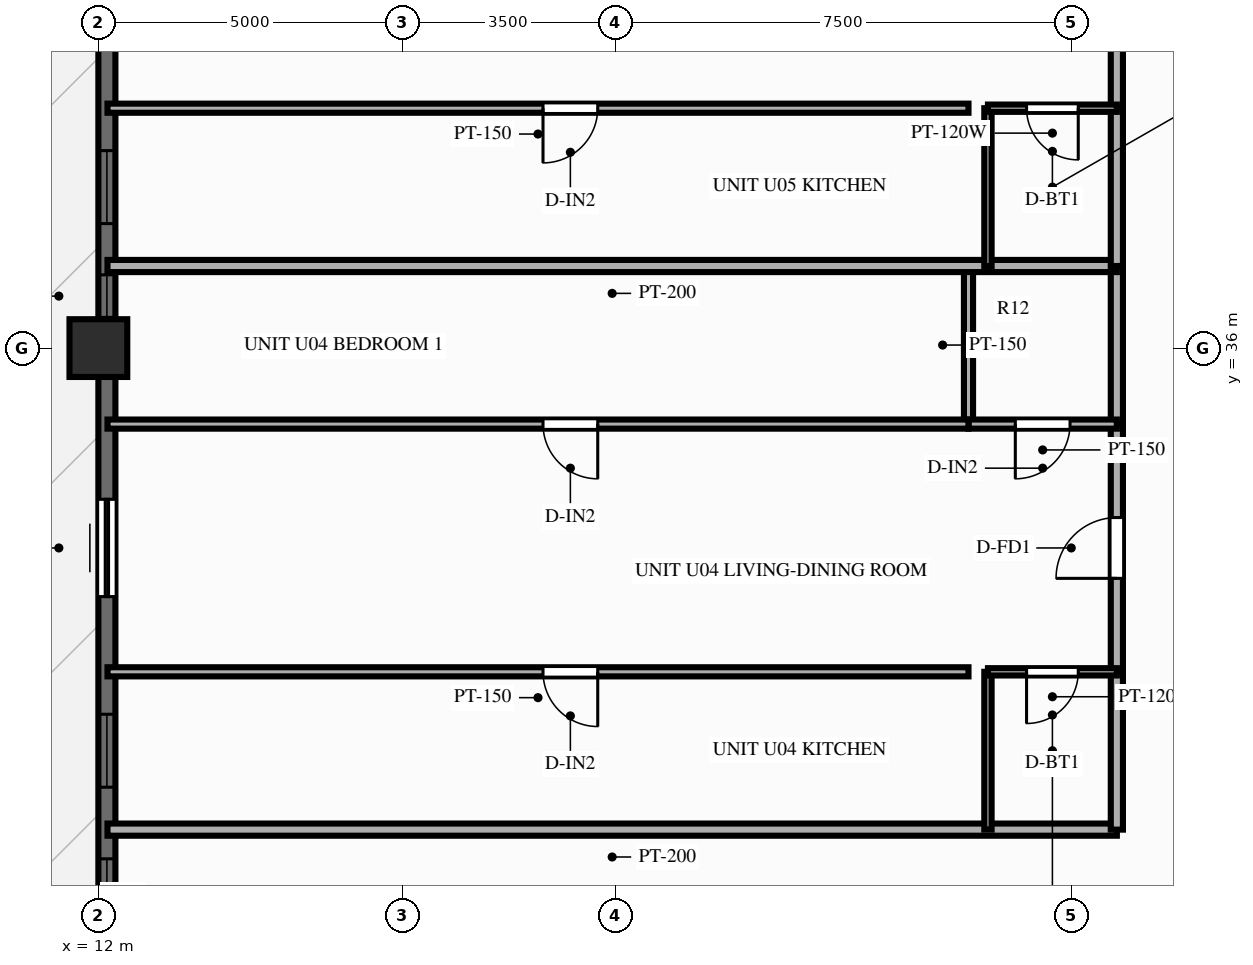
"""IFC4 building model, lengths in metres.
Left out: names, types, materials, properties, quantities, classifications, styles, units other than length and angle.
Written with IfcOpenShell. Run it as: python <this file> out.ifc"""

import sys

from ifc_helpers import new_model, si_unit, direction, frame, frame_2d, origin, origin_2d, place, context, subcontext, project, spatial, rectangle, extrude, source, transform, mapped, element, fill, save


model = new_model("IFC4")
c1 = context("Model", 3, precision=1e-05, world=origin(), true_north=direction((0.0, 1.0)))
c2 = subcontext(c1, "Body", "Model", "MODEL_VIEW")
j1 = project(units=[si_unit("LENGTHUNIT", "METRE"), si_unit("PLANEANGLEUNIT", "RADIAN")], contexts=[c1])
p1 = place(None, origin())
s1 = spatial("IfcSite", under=j1, at=p1, CompositionType="ELEMENT")
p2 = place(p1, origin())
s2 = spatial("IfcBuilding", under=s1, at=p2, CompositionType="ELEMENT")
p3 = place(p2, frame((0.0, 0.0, 138.75)))
s3 = spatial("IfcBuildingStorey", under=s2, at=p3, CompositionType="ELEMENT", Elevation=138.75)
m1 = source(origin(), c2, "Body", "SweptSolid", [
    extrude(rectangle(XDim=0.95, YDim=0.95, at=origin_2d()), origin(), (0.0, 0.0, 1.0), 3.0),
])
p4 = place(p3, frame((12.0, 36.0, 0.0), z_axis=(0.0, 0.0, 1.0), x_axis=(1.0, 0.0, 0.0)))
e1 = element("IfcColumn", 1, at=p4, inside=s3, PredefinedType="COLUMN", context=c2, shape_type="MappedRepresentation", body=[
    mapped(m1, transform((0.0, 0.0, 0.0), scale=1.0)),
])
p5 = place(p3, frame((12.14, 7.2, 0.0), z_axis=(0.0, 0.0, 1.0), x_axis=(0.0, 1.0, 0.0)))
e2 = element("IfcWall", 2, at=p5, inside=s3, PredefinedType="SOLIDWALL", context=c2, shape_type="SweptSolid", body=[
    extrude(rectangle(XDim=39.6, YDim=0.28, at=frame_2d((19.8, 0.0))), origin(), (0.0, 0.0, 1.0), 2.28),
])
p6 = place(p5, frame((0.945, 0.0, 0.25)))
e3 = element("IfcOpeningElement", 3, at=p6, cuts=e2, PredefinedType="OPENING", context=c2, shape_type="SweptSolid", body=[
    extrude(rectangle(XDim=1.2, YDim=1.5, at=frame_2d((0.6, 0.75))), frame((0.0, 0.152, 0.0), z_axis=(0.0, -1.0, 0.0), x_axis=(1.0, 0.0, 0.0)), (0.0, 0.0, 1.0), 0.304),
])
p7 = place(p5, frame((4.213, 0.0, 0.25)))
e4 = element("IfcOpeningElement", 4, at=p7, cuts=e2, PredefinedType="OPENING", context=c2, shape_type="SweptSolid", body=[
    extrude(rectangle(XDim=1.2, YDim=1.5, at=frame_2d((0.6, 0.75))), frame((0.0, 0.152, 0.0), z_axis=(0.0, -1.0, 0.0), x_axis=(1.0, 0.0, 0.0)), (0.0, 0.0, 1.0), 0.304),
])
p8 = place(p5, frame((7.55, 0.0, 0.25)))
e5 = element("IfcOpeningElement", 5, at=p8, cuts=e2, PredefinedType="OPENING", context=c2, shape_type="SweptSolid", body=[
    extrude(rectangle(XDim=1.2, YDim=1.5, at=frame_2d((0.6, 0.75))), frame((0.0, 0.152, 0.0), z_axis=(0.0, -1.0, 0.0), x_axis=(1.0, 0.0, 0.0)), (0.0, 0.0, 1.0), 0.304),
])
p9 = place(p5, frame((13.483, 0.0, 0.25)))
e6 = element("IfcOpeningElement", 6, at=p9, cuts=e2, PredefinedType="OPENING", context=c2, shape_type="SweptSolid", body=[
    extrude(rectangle(XDim=1.2, YDim=1.5, at=frame_2d((0.6, 0.75))), frame((0.0, 0.152, 0.0), z_axis=(0.0, -1.0, 0.0), x_axis=(1.0, 0.0, 0.0)), (0.0, 0.0, 1.0), 0.304),
])
p10 = place(p5, frame((16.82, 0.0, 0.25)))
e7 = element("IfcOpeningElement", 7, at=p10, cuts=e2, PredefinedType="OPENING", context=c2, shape_type="SweptSolid", body=[
    extrude(rectangle(XDim=1.2, YDim=1.5, at=frame_2d((0.6, 0.75))), frame((0.0, 0.152, 0.0), z_axis=(0.0, -1.0, 0.0), x_axis=(1.0, 0.0, 0.0)), (0.0, 0.0, 1.0), 0.304),
])
p11 = place(p5, frame((19.2, 0.0, 0.25)))
e8 = element("IfcOpeningElement", 8, at=p11, cuts=e2, PredefinedType="OPENING", context=c2, shape_type="SweptSolid", body=[
    extrude(rectangle(XDim=1.2, YDim=1.5, at=frame_2d((0.6, 0.75))), frame((0.0, 0.152, 0.0), z_axis=(0.0, -1.0, 0.0), x_axis=(1.0, 0.0, 0.0)), (0.0, 0.0, 1.0), 0.304),
])
p12 = place(p5, frame((21.578, 0.0, 0.25)))
e9 = element("IfcOpeningElement", 9, at=p12, cuts=e2, PredefinedType="OPENING", context=c2, shape_type="SweptSolid", body=[
    extrude(rectangle(XDim=1.2, YDim=1.5, at=frame_2d((0.6, 0.75))), frame((0.0, 0.152, 0.0), z_axis=(0.0, -1.0, 0.0), x_axis=(1.0, 0.0, 0.0)), (0.0, 0.0, 1.0), 0.304),
])
p13 = place(p5, frame((24.713, 0.0, 0.0)))
e10 = element("IfcOpeningElement", 10, at=p13, cuts=e2, PredefinedType="OPENING", context=c2, shape_type="SweptSolid", body=[
    extrude(rectangle(XDim=1.6, YDim=2.15, at=frame_2d((0.8, 1.075))), frame((0.0, 0.152, 0.0), z_axis=(0.0, -1.0, 0.0), x_axis=(1.0, 0.0, 0.0)), (0.0, 0.0, 1.0), 0.304),
])
p14 = place(p5, frame((29.305, 0.0, 0.25)))
e11 = element("IfcOpeningElement", 11, at=p14, cuts=e2, PredefinedType="OPENING", context=c2, shape_type="SweptSolid", body=[
    extrude(rectangle(XDim=0.7, YDim=1.5, at=frame_2d((0.35, 0.75))), frame((0.0, 0.152, 0.0), z_axis=(0.0, -1.0, 0.0), x_axis=(1.0, 0.0, 0.0)), (0.0, 0.0, 1.0), 0.304),
])
p15 = place(p5, frame((30.848, 0.0, 0.25)))
e12 = element("IfcOpeningElement", 12, at=p15, cuts=e2, PredefinedType="OPENING", context=c2, shape_type="SweptSolid", body=[
    extrude(rectangle(XDim=1.2, YDim=1.5, at=frame_2d((0.6, 0.75))), frame((0.0, 0.152, 0.0), z_axis=(0.0, -1.0, 0.0), x_axis=(1.0, 0.0, 0.0)), (0.0, 0.0, 1.0), 0.304),
])
p16 = place(p5, frame((34.183, 0.0, 0.25)))
e13 = element("IfcOpeningElement", 13, at=p16, cuts=e2, PredefinedType="OPENING", context=c2, shape_type="SweptSolid", body=[
    extrude(rectangle(XDim=1.2, YDim=1.5, at=frame_2d((0.6, 0.75))), frame((0.0, 0.152, 0.0), z_axis=(0.0, -1.0, 0.0), x_axis=(1.0, 0.0, 0.0)), (0.0, 0.0, 1.0), 0.304),
])
p17 = place(p5, frame((37.452, 0.0, 0.25)))
e14 = element("IfcOpeningElement", 14, at=p17, cuts=e2, PredefinedType="OPENING", context=c2, shape_type="SweptSolid", body=[
    extrude(rectangle(XDim=1.2, YDim=1.5, at=frame_2d((0.6, 0.75))), frame((0.0, 0.152, 0.0), z_axis=(0.0, -1.0, 0.0), x_axis=(1.0, 0.0, 0.0)), (0.0, 0.0, 1.0), 0.304),
])
p18 = place(p3, frame((28.75, 28.08, 0.0), z_axis=(0.0, 0.0, 1.0), x_axis=(-1.0, 0.0, 0.0)))
e15 = element("IfcWall", 15, at=p18, inside=s3, PredefinedType="PARTITIONING", context=c2, shape_type="SweptSolid", body=[
    extrude(rectangle(XDim=16.6, YDim=0.2, at=frame_2d((8.3, 0.0))), origin(), (0.0, 0.0, 1.0), 2.79),
])
p19 = place(p3, frame((28.75, 28.08, 0.0), z_axis=(0.0, 0.0, 1.0), x_axis=(0.0, 1.0, 0.0)))
e16 = element("IfcWall", 16, at=p19, inside=s3, PredefinedType="PARTITIONING", context=c2, shape_type="SweptSolid", body=[
    extrude(rectangle(XDim=2.595, YDim=0.2, at=frame_2d((1.298, 0.0))), origin(), (0.0, 0.0, 1.0), 2.79),
])
p20 = place(p3, frame((28.75, 30.676, 0.0), z_axis=(0.0, 0.0, 1.0), x_axis=(0.0, 1.0, 0.0)))
e17 = element("IfcWall", 17, at=p20, inside=s3, PredefinedType="PARTITIONING", context=c2, shape_type="SweptSolid", body=[
    extrude(rectangle(XDim=4.074, YDim=0.2, at=frame_2d((2.037, 0.0))), origin(), (0.0, 0.0, 1.0), 2.79),
])
p21 = place(p20, frame((1.537, 0.0, 0.0)))
e18 = element("IfcOpeningElement", 18, at=p21, cuts=e17, PredefinedType="OPENING", context=c2, shape_type="SweptSolid", body=[
    extrude(rectangle(XDim=1.0, YDim=2.15, at=frame_2d((0.5, 1.075))), frame((0.0, 0.112, 0.0), z_axis=(0.0, -1.0, 0.0), x_axis=(1.0, 0.0, 0.0)), (0.0, 0.0, 1.0), 0.224),
])
p22 = place(p3, frame((28.75, 34.75, 0.0), z_axis=(0.0, 0.0, 1.0), x_axis=(0.0, 1.0, 0.0)))
e19 = element("IfcWall", 19, at=p22, inside=s3, PredefinedType="PARTITIONING", context=c2, shape_type="SweptSolid", body=[
    extrude(rectangle(XDim=2.6, YDim=0.2, at=frame_2d((1.3, 0.0))), origin(), (0.0, 0.0, 1.0), 2.79),
])
p23 = place(p3, frame((26.63, 28.08, 0.0), z_axis=(0.0, 0.0, 1.0), x_axis=(0.0, 1.0, 0.0)))
e20 = element("IfcWall", 20, at=p23, inside=s3, PredefinedType="PARTITIONING", context=c2, shape_type="SweptSolid", body=[
    extrude(rectangle(XDim=2.595, YDim=0.12, at=frame_2d((1.298, 0.0))), origin(), (0.0, 0.0, 1.0), 2.79),
])
p24 = place(p3, frame((26.31, 34.75, 0.0), z_axis=(0.0, 0.0, 1.0), x_axis=(0.0, 1.0, 0.0)))
e21 = element("IfcWall", 21, at=p24, inside=s3, PredefinedType="PARTITIONING", context=c2, shape_type="SweptSolid", body=[
    extrude(rectangle(XDim=2.6, YDim=0.15, at=frame_2d((1.3, 0.0))), origin(), (0.0, 0.0, 1.0), 2.79),
])
p25 = place(p3, frame((28.75, 30.676, 0.0), z_axis=(0.0, 0.0, 1.0), x_axis=(-1.0, 0.0, 0.0)))
e22 = element("IfcWall", 22, at=p25, inside=s3, PredefinedType="PARTITIONING", context=c2, shape_type="SweptSolid", body=[
    extrude(rectangle(XDim=2.12, YDim=0.12, at=frame_2d((1.06, 0.0))), origin(), (0.0, 0.0, 1.0), 2.79),
])
p26 = place(p25, frame((0.635, 0.0, 0.0)))
e23 = element("IfcOpeningElement", 23, at=p26, cuts=e22, PredefinedType="OPENING", context=c2, shape_type="SweptSolid", body=[
    extrude(rectangle(XDim=0.85, YDim=2.05, at=frame_2d((0.425, 1.025))), frame((0.0, 0.072, 0.0), z_axis=(0.0, -1.0, 0.0), x_axis=(1.0, 0.0, 0.0)), (0.0, 0.0, 1.0), 0.144),
])
p27 = place(p3, frame((26.31, 30.676, 0.0), z_axis=(0.0, 0.0, 1.0), x_axis=(-1.0, 0.0, 0.0)))
e24 = element("IfcWall", 24, at=p27, inside=s3, PredefinedType="PARTITIONING", context=c2, shape_type="SweptSolid", body=[
    extrude(rectangle(XDim=14.16, YDim=0.15, at=frame_2d((7.08, 0.0))), origin(), (0.0, 0.0, 1.0), 2.79),
])
p28 = place(p27, frame((6.097, 0.0, 0.0)))
e25 = element("IfcOpeningElement", 25, at=p28, cuts=e24, PredefinedType="OPENING", context=c2, shape_type="SweptSolid", body=[
    extrude(rectangle(XDim=0.9, YDim=2.1, at=frame_2d((0.45, 1.05))), frame((0.0, 0.087, 0.0), z_axis=(0.0, -1.0, 0.0), x_axis=(1.0, 0.0, 0.0)), (0.0, 0.0, 1.0), 0.174),
])
p29 = place(p3, frame((28.75, 34.75, 0.0), z_axis=(0.0, 0.0, 1.0), x_axis=(-1.0, 0.0, 0.0)))
e26 = element("IfcWall", 26, at=p29, inside=s3, PredefinedType="PARTITIONING", context=c2, shape_type="SweptSolid", body=[
    extrude(rectangle(XDim=2.44, YDim=0.15, at=frame_2d((1.22, 0.0))), origin(), (0.0, 0.0, 1.0), 2.79),
])
p30 = place(p29, frame((0.77, 0.0, 0.0)))
e27 = element("IfcOpeningElement", 27, at=p30, cuts=e26, PredefinedType="OPENING", context=c2, shape_type="SweptSolid", body=[
    extrude(rectangle(XDim=0.9, YDim=2.1, at=frame_2d((0.45, 1.05))), frame((0.0, 0.087, 0.0), z_axis=(0.0, -1.0, 0.0), x_axis=(1.0, 0.0, 0.0)), (0.0, 0.0, 1.0), 0.174),
])
p31 = place(p3, frame((26.31, 34.75, 0.0), z_axis=(0.0, 0.0, 1.0), x_axis=(-1.0, 0.0, 0.0)))
e28 = element("IfcWall", 28, at=p31, inside=s3, PredefinedType="PARTITIONING", context=c2, shape_type="SweptSolid", body=[
    extrude(rectangle(XDim=14.16, YDim=0.15, at=frame_2d((7.08, 0.0))), origin(), (0.0, 0.0, 1.0), 2.79),
])
p32 = place(p31, frame((6.097, 0.0, 0.0)))
e29 = element("IfcOpeningElement", 29, at=p32, cuts=e28, PredefinedType="OPENING", context=c2, shape_type="SweptSolid", body=[
    extrude(rectangle(XDim=0.9, YDim=2.1, at=frame_2d((0.45, 1.05))), frame((0.0, 0.087, 0.0), z_axis=(0.0, -1.0, 0.0), x_axis=(1.0, 0.0, 0.0)), (0.0, 0.0, 1.0), 0.174),
])
p33 = place(p3, frame((28.75, 37.35, 0.0), z_axis=(0.0, 0.0, 1.0), x_axis=(-1.0, 0.0, 0.0)))
e30 = element("IfcWall", 30, at=p33, inside=s3, PredefinedType="PARTITIONING", context=c2, shape_type="SweptSolid", body=[
    extrude(rectangle(XDim=16.6, YDim=0.2, at=frame_2d((8.3, 0.0))), origin(), (0.0, 0.0, 1.0), 2.79),
])
p34 = place(p3, frame((28.75, 37.35, 0.0), z_axis=(0.0, 0.0, 1.0), x_axis=(0.0, 1.0, 0.0)))
e31 = element("IfcWall", 31, at=p34, inside=s3, PredefinedType="PARTITIONING", context=c2, shape_type="SweptSolid", body=[
    extrude(rectangle(XDim=2.595, YDim=0.2, at=frame_2d((1.298, 0.0))), origin(), (0.0, 0.0, 1.0), 2.79),
])
p35 = place(p3, frame((28.75, 39.946, 0.0), z_axis=(0.0, 0.0, 1.0), x_axis=(0.0, 1.0, 0.0)))
e32 = element("IfcWall", 32, at=p35, inside=s3, PredefinedType="PARTITIONING", context=c2, shape_type="SweptSolid", body=[
    extrude(rectangle(XDim=4.074, YDim=0.2, at=frame_2d((2.037, 0.0))), origin(), (0.0, 0.0, 1.0), 2.79),
])
p36 = place(p35, frame((1.537, 0.0, 0.0)))
e33 = element("IfcOpeningElement", 33, at=p36, cuts=e32, PredefinedType="OPENING", context=c2, shape_type="SweptSolid", body=[
    extrude(rectangle(XDim=1.0, YDim=2.15, at=frame_2d((0.5, 1.075))), frame((0.0, 0.112, 0.0), z_axis=(0.0, -1.0, 0.0), x_axis=(1.0, 0.0, 0.0)), (0.0, 0.0, 1.0), 0.224),
])
p37 = place(p3, frame((26.63, 37.35, 0.0), z_axis=(0.0, 0.0, 1.0), x_axis=(0.0, 1.0, 0.0)))
e34 = element("IfcWall", 34, at=p37, inside=s3, PredefinedType="PARTITIONING", context=c2, shape_type="SweptSolid", body=[
    extrude(rectangle(XDim=2.595, YDim=0.12, at=frame_2d((1.298, 0.0))), origin(), (0.0, 0.0, 1.0), 2.79),
])
p38 = place(p3, frame((28.75, 39.946, 0.0), z_axis=(0.0, 0.0, 1.0), x_axis=(-1.0, 0.0, 0.0)))
e35 = element("IfcWall", 35, at=p38, inside=s3, PredefinedType="PARTITIONING", context=c2, shape_type="SweptSolid", body=[
    extrude(rectangle(XDim=2.12, YDim=0.12, at=frame_2d((1.06, 0.0))), origin(), (0.0, 0.0, 1.0), 2.79),
])
p39 = place(p38, frame((0.635, 0.0, 0.0)))
e36 = element("IfcOpeningElement", 36, at=p39, cuts=e35, PredefinedType="OPENING", context=c2, shape_type="SweptSolid", body=[
    extrude(rectangle(XDim=0.85, YDim=2.05, at=frame_2d((0.425, 1.025))), frame((0.0, 0.072, 0.0), z_axis=(0.0, -1.0, 0.0), x_axis=(1.0, 0.0, 0.0)), (0.0, 0.0, 1.0), 0.144),
])
p40 = place(p3, frame((26.31, 39.946, 0.0), z_axis=(0.0, 0.0, 1.0), x_axis=(-1.0, 0.0, 0.0)))
e37 = element("IfcWall", 37, at=p40, inside=s3, PredefinedType="PARTITIONING", context=c2, shape_type="SweptSolid", body=[
    extrude(rectangle(XDim=14.16, YDim=0.15, at=frame_2d((7.08, 0.0))), origin(), (0.0, 0.0, 1.0), 2.79),
])
p41 = place(p40, frame((6.097, 0.0, 0.0)))
e38 = element("IfcOpeningElement", 38, at=p41, cuts=e37, PredefinedType="OPENING", context=c2, shape_type="SweptSolid", body=[
    extrude(rectangle(XDim=0.9, YDim=2.1, at=frame_2d((0.45, 1.05))), frame((0.0, 0.087, 0.0), z_axis=(0.0, -1.0, 0.0), x_axis=(1.0, 0.0, 0.0)), (0.0, 0.0, 1.0), 0.174),
])
m2 = source(origin(), c2, "Body", "SweptSolid", [
    extrude(rectangle(XDim=1.2, YDim=1.5, at=frame_2d((0.6, 0.75))), frame((0.0, 0.03, 0.0), z_axis=(0.0, -1.0, 0.0), x_axis=(1.0, 0.0, 0.0)), (0.0, 0.0, 1.0), 0.06),
])
p42 = place(p11, origin())
e39 = element("IfcWindow", 39, at=p42, inside=s3, PartitioningType="SINGLE_PANEL", PredefinedType="WINDOW", context=c2, shape_type="MappedRepresentation", body=[
    mapped(m2, transform((0.0, 0.0, 0.0), scale=1.0)),
])
fill(e8, e39)
p43 = place(p12, origin())
e40 = element("IfcWindow", 40, at=p43, inside=s3, PartitioningType="SINGLE_PANEL", PredefinedType="WINDOW", context=c2, shape_type="MappedRepresentation", body=[
    mapped(m2, transform((0.0, 0.0, 0.0), scale=1.0)),
])
fill(e9, e40)
m3 = source(origin(), c2, "Body", "SweptSolid", [
    extrude(rectangle(XDim=1.6, YDim=2.15, at=frame_2d((0.8, 1.075))), frame((0.0, 0.025, 0.0), z_axis=(0.0, -1.0, 0.0), x_axis=(1.0, 0.0, 0.0)), (0.0, 0.0, 1.0), 0.05),
])
p44 = place(p13, origin())
e41 = element("IfcDoor", 41, at=p44, inside=s3, OperationType="SLIDING_TO_LEFT", PredefinedType="DOOR", context=c2, shape_type="MappedRepresentation", body=[
    mapped(m3, transform((0.0, 0.0, 0.0), scale=1.0)),
])
fill(e10, e41)
m4 = source(origin(), c2, "Body", "SweptSolid", [
    extrude(rectangle(XDim=0.7, YDim=1.5, at=frame_2d((0.35, 0.75))), frame((0.0, 0.03, 0.0), z_axis=(0.0, -1.0, 0.0), x_axis=(1.0, 0.0, 0.0)), (0.0, 0.0, 1.0), 0.06),
])
p45 = place(p14, origin())
e42 = element("IfcWindow", 42, at=p45, inside=s3, PartitioningType="SINGLE_PANEL", PredefinedType="WINDOW", context=c2, shape_type="MappedRepresentation", body=[
    mapped(m4, transform((0.0, 0.0, 0.0), scale=1.0)),
])
fill(e11, e42)
p46 = place(p15, origin())
e43 = element("IfcWindow", 43, at=p46, inside=s3, PartitioningType="SINGLE_PANEL", PredefinedType="WINDOW", context=c2, shape_type="MappedRepresentation", body=[
    mapped(m2, transform((0.0, 0.0, 0.0), scale=1.0)),
])
fill(e12, e43)
m5 = source(origin(), c2, "Body", "SweptSolid", [
    extrude(rectangle(XDim=1.0, YDim=2.15, at=frame_2d((0.5, 1.075))), frame((0.0, 0.025, 0.0), z_axis=(0.0, -1.0, 0.0), x_axis=(1.0, 0.0, 0.0)), (0.0, 0.0, 1.0), 0.05),
])
p47 = place(p21, origin())
e44 = element("IfcDoor", 44, at=p47, inside=s3, OperationType="SINGLE_SWING_LEFT", PredefinedType="DOOR", context=c2, shape_type="MappedRepresentation", body=[
    mapped(m5, transform((0.0, 0.0, 0.0), scale=1.0)),
])
fill(e18, e44)
m6 = source(origin(), c2, "Body", "SweptSolid", [
    extrude(rectangle(XDim=0.85, YDim=2.05, at=frame_2d((0.425, 1.025))), frame((0.0, 0.025, 0.0), z_axis=(0.0, -1.0, 0.0), x_axis=(1.0, 0.0, 0.0)), (0.0, 0.0, 1.0), 0.05),
])
p48 = place(p26, origin())
e45 = element("IfcDoor", 45, at=p48, inside=s3, OperationType="SINGLE_SWING_RIGHT", PredefinedType="DOOR", context=c2, shape_type="MappedRepresentation", body=[
    mapped(m6, transform((0.0, 0.0, 0.0), scale=1.0)),
])
fill(e23, e45)
m7 = source(origin(), c2, "Body", "SweptSolid", [
    extrude(rectangle(XDim=0.9, YDim=2.1, at=frame_2d((0.45, 1.05))), frame((0.0, 0.025, 0.0), z_axis=(0.0, -1.0, 0.0), x_axis=(1.0, 0.0, 0.0)), (0.0, 0.0, 1.0), 0.05),
])
p49 = place(p28, origin())
e46 = element("IfcDoor", 46, at=p49, inside=s3, OperationType="SINGLE_SWING_LEFT", PredefinedType="DOOR", context=c2, shape_type="MappedRepresentation", body=[
    mapped(m7, transform((0.0, 0.0, 0.0), scale=1.0)),
])
fill(e25, e46)
p50 = place(p30, origin())
e47 = element("IfcDoor", 47, at=p50, inside=s3, OperationType="SINGLE_SWING_RIGHT", PredefinedType="DOOR", context=c2, shape_type="MappedRepresentation", body=[
    mapped(m7, transform((0.0, 0.0, 0.0), scale=1.0)),
])
fill(e27, e47)
p51 = place(p32, origin())
e48 = element("IfcDoor", 48, at=p51, inside=s3, OperationType="SINGLE_SWING_LEFT", PredefinedType="DOOR", context=c2, shape_type="MappedRepresentation", body=[
    mapped(m7, transform((0.0, 0.0, 0.0), scale=1.0)),
])
fill(e29, e48)
p52 = place(p39, origin())
e49 = element("IfcDoor", 49, at=p52, inside=s3, OperationType="SINGLE_SWING_LEFT", PredefinedType="DOOR", context=c2, shape_type="MappedRepresentation", body=[
    mapped(m6, transform((0.0, 0.0, 0.0), scale=1.0)),
])
fill(e36, e49)
p53 = place(p41, origin())
e50 = element("IfcDoor", 50, at=p53, inside=s3, OperationType="SINGLE_SWING_RIGHT", PredefinedType="DOOR", context=c2, shape_type="MappedRepresentation", body=[
    mapped(m7, transform((0.0, 0.0, 0.0), scale=1.0)),
])
fill(e38, e50)
save(model, sys.argv[1])
